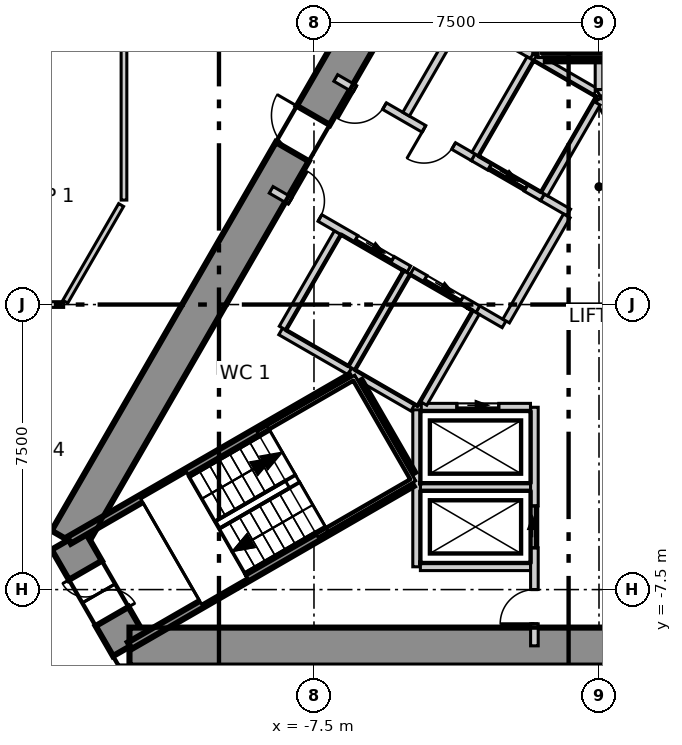
"""IFC4 building model, lengths in metres.
Left out: names, types, materials, properties, quantities, classifications, styles, units other than length and angle.
Written with IfcOpenShell. Run it as: python <this file> out.ifc"""

import sys

from ifc_helpers import new_model, si_unit, direction, frame, frame_2d, origin, place, context, subcontext, project, spatial, polyline, rectangle, outline, extrude, element, fill, save


model = new_model("IFC4")
c1 = context("Model", 3, precision=1e-05, world=origin(), true_north=direction((0.0, 1.0)))
c2 = subcontext(c1, "Body", "Model", "MODEL_VIEW")
j1 = project(units=[si_unit("LENGTHUNIT", "METRE"), si_unit("PLANEANGLEUNIT", "RADIAN")], contexts=[c1])
p1 = place(None, origin())
s1 = spatial("IfcSite", under=j1, at=p1, CompositionType="ELEMENT")
p2 = place(p1, origin())
s2 = spatial("IfcBuilding", under=s1, at=p2, CompositionType="ELEMENT")
p3 = place(p2, frame((0.0, 0.0, 19.9)))
s3 = spatial("IfcBuildingStorey", under=s2, at=p3, CompositionType="ELEMENT", Elevation=19.9)
p4 = place(p3, frame((-1.617, 15.2, -0.4), z_axis=(0.0, 0.0, 1.0), x_axis=(-0.499992141631, -0.866029940768, 0.0)))
e1 = element("IfcWall", 1, at=p4, inside=s3, PredefinedType="SHEAR", context=c2, shape_type="SweptSolid", body=[
    extrude(outline(polyline([(-0.289, -0.499), (1.656, -0.499), (3.601, -0.499), (5.547, -0.499), (7.492, -0.499), (9.437, -0.5), (11.382, -0.5), (13.328, -0.5), (15.273, -0.5), (17.218, -0.5), (19.163, -0.5), (21.109, -0.5), (23.054, -0.5), (24.999, -0.5), (24.422, 0.5), (22.566, 0.5), (20.709, 0.5), (18.853, 0.5), (16.997, 0.5), (15.14, 0.5), (13.284, 0.5), (11.427, 0.5), (9.571, 0.5), (7.715, 0.5), (5.858, 0.5), (4.002, 0.5), (2.146, 0.5), (0.289, 0.5), (-0.289, -0.499)])), origin(), (0.0, 0.0, 1.0), 5.4),
])
p5 = place(p4, frame((11.805, 0.0, 0.4)))
e2 = element("IfcOpeningElement", 2, at=p5, cuts=e1, PredefinedType="OPENING", context=c2, shape_type="SweptSolid", body=[
    extrude(rectangle(XDim=1.1, YDim=2.1, at=frame_2d((0.55, 1.05))), frame((0.0, 0.51, 0.0), z_axis=(0.0, -1.0, 0.0), x_axis=(1.0, 0.0, 0.0)), (0.0, 0.0, 1.0), 1.02),
])
p6 = place(p3, frame((-13.972, -6.2, -0.4), z_axis=(0.0, 0.0, 1.0), x_axis=(0.500077567175, -0.865980615723, 0.0)))
e3 = element("IfcWall", 3, at=p6, inside=s3, PredefinedType="SHEAR", context=c2, shape_type="SweptSolid", body=[
    extrude(outline(polyline([(-0.289, -0.5), (1.616, -0.5), (3.522, -0.5), (2.944, 0.499), (1.617, 0.5), (0.289, 0.5), (-0.289, -0.5)])), origin(), (0.0, 0.0, 1.0), 5.4),
])
p7 = place(p6, frame((0.917, 0.0, 0.4)))
e4 = element("IfcOpeningElement", 4, at=p7, cuts=e3, PredefinedType="OPENING", context=c2, shape_type="SweptSolid", body=[
    extrude(rectangle(XDim=1.4, YDim=2.1, at=frame_2d((0.7, 1.05))), frame((0.0, 0.51, 0.0), z_axis=(0.0, -1.0, 0.0), x_axis=(1.0, 0.0, 0.0)), (0.0, 0.0, 1.0), 1.02),
])
p8 = place(p3, frame((-12.355, -9.0, -0.4), z_axis=(0.0, 0.0, 1.0), x_axis=(1.0, 0.0, 0.0)))
e5 = element("IfcWall", 5, at=p8, inside=s3, PredefinedType="SHEAR", context=c2, shape_type="SweptSolid", body=[
    extrude(outline(polyline([(-0.289, -0.5), (1.656, -0.5), (3.601, -0.5), (5.547, -0.5), (7.492, -0.5), (9.437, -0.5), (11.382, -0.5), (13.328, -0.5), (15.273, -0.5), (17.218, -0.5), (19.163, -0.5), (21.109, -0.5), (23.054, -0.5), (24.999, -0.5), (24.422, 0.5), (22.566, 0.5), (20.709, 0.5), (18.853, 0.5), (16.996, 0.5), (15.14, 0.5), (13.283, 0.5), (11.427, 0.5), (9.57, 0.5), (7.714, 0.5), (5.857, 0.5), (4.001, 0.5), (2.145, 0.5), (0.288, 0.5), (-0.289, -0.5)])), origin(), (0.0, 0.0, 1.0), 5.4),
])
p9 = place(p3, frame((-20.467, 0.0, 0.0), z_axis=(0.0, 0.0, 1.0), x_axis=(1.0, 0.0, 0.0)))
e6 = element("IfcWall", 6, at=p9, inside=s3, PredefinedType="PARTITIONING", context=c2, shape_type="SweptSolid", body=[
    extrude(rectangle(XDim=6.38, YDim=0.15, at=frame_2d((3.19, 0.0))), origin(), (0.0, 0.0, 1.0), 5.0),
])
p10 = place(p3, frame((-12.5, 2.749, 0.0), z_axis=(0.0, 0.0, 1.0), x_axis=(0.0, 1.0, 0.0)))
e7 = element("IfcWall", 7, at=p10, inside=s3, PredefinedType="PARTITIONING", context=c2, shape_type="SweptSolid", body=[
    extrude(rectangle(XDim=7.176, YDim=0.15, at=frame_2d((3.588, 0.0))), origin(), (0.0, 0.0, 1.0), 5.0),
])
p11 = place(p3, frame((-14.044, 0.075, 0.0), z_axis=(0.0, 0.0, 1.0), x_axis=(0.500062965414, 0.865989047634, 0.0)))
e8 = element("IfcWall", 8, at=p11, inside=s3, PredefinedType="PARTITIONING", context=c2, shape_type="SweptSolid", body=[
    extrude(rectangle(XDim=2.938, YDim=0.15, at=frame_2d((1.469, 0.0))), origin(), (0.0, 0.0, 1.0), 5.0),
])
p12 = place(p3, frame((-8.376, -0.707, 0.0), z_axis=(0.0, 0.0, 1.0), x_axis=(0.866067520717, -0.499927044236, 0.0)))
e9 = element("IfcWall", 9, at=p12, inside=s3, PredefinedType="SOLIDWALL", context=c2, shape_type="SweptSolid", body=[
    extrude(rectangle(XDim=2.1, YDim=0.2, at=frame_2d((1.05, 0.0))), origin(), (0.0, 0.0, 1.0), 5.0),
])
p13 = place(p3, frame((-8.326, -0.62, 0.0), z_axis=(0.0, 0.0, 1.0), x_axis=(0.500023687443, 0.866011727401, 0.0)))
e10 = element("IfcWall", 10, at=p13, inside=s3, PredefinedType="SOLIDWALL", context=c2, shape_type="SweptSolid", body=[
    extrude(rectangle(XDim=2.9, YDim=0.2, at=frame_2d((1.45, 0.0))), origin(), (0.0, 0.0, 1.0), 5.0),
])
p14 = place(p3, frame((-4.7, -4.8, 0.0), z_axis=(0.0, 0.0, 1.0), x_axis=(1.0, 0.0, 0.0)))
e11 = element("IfcWall", 11, at=p14, inside=s3, PredefinedType="SOLIDWALL", context=c2, shape_type="SweptSolid", body=[
    extrude(rectangle(XDim=2.9, YDim=0.2, at=frame_2d((1.45, 0.0))), origin(), (0.0, 0.0, 1.0), 5.0),
])
p15 = place(p3, frame((-4.8, -6.9, 0.0), z_axis=(0.0, 0.0, 1.0), x_axis=(0.0, 1.0, 0.0)))
e12 = element("IfcWall", 12, at=p15, inside=s3, PredefinedType="SOLIDWALL", context=c2, shape_type="SweptSolid", body=[
    extrude(rectangle(XDim=4.131, YDim=0.2, at=frame_2d((2.065, 0.0))), origin(), (0.0, 0.0, 1.0), 5.0),
])
p16 = place(p3, frame((-4.7, -6.9, 0.0), z_axis=(0.0, 0.0, 1.0), x_axis=(1.0, 0.0, 0.0)))
e13 = element("IfcWall", 13, at=p16, inside=s3, PredefinedType="SOLIDWALL", context=c2, shape_type="SweptSolid", body=[
    extrude(rectangle(XDim=2.9, YDim=0.2, at=frame_2d((1.45, 0.0))), origin(), (0.0, 0.0, 1.0), 5.0),
])
p17 = place(p3, frame((-1.7, -8.98, 0.0), z_axis=(0.0, 0.0, 1.0), x_axis=(0.0, 1.0, 0.0)))
e14 = element("IfcWall", 14, at=p17, inside=s3, PredefinedType="SOLIDWALL", context=c2, shape_type="SweptSolid", body=[
    extrude(rectangle(XDim=6.277, YDim=0.2, at=frame_2d((3.139, 0.0))), origin(), (0.0, 0.0, 1.0), 5.0),
])
p18 = place(p17, frame((2.58, 0.0, 0.0)))
e15 = element("IfcOpeningElement", 15, at=p18, cuts=e14, PredefinedType="OPENING", context=c2, shape_type="SweptSolid", body=[
    extrude(rectangle(XDim=1.1, YDim=2.1, at=frame_2d((0.55, 1.05))), frame((0.0, 0.11, 0.0), z_axis=(0.0, -1.0, 0.0), x_axis=(1.0, 0.0, 0.0)), (0.0, 0.0, 1.0), 0.22),
])
p19 = place(p17, frame((0.58, 0.0, 0.0)))
e16 = element("IfcOpeningElement", 16, at=p19, cuts=e14, PredefinedType="OPENING", context=c2, shape_type="SweptSolid", body=[
    extrude(rectangle(XDim=0.9, YDim=2.1, at=frame_2d((0.45, 1.05))), frame((0.0, 0.11, 0.0), z_axis=(0.0, -1.0, 0.0), x_axis=(1.0, 0.0, 0.0)), (0.0, 0.0, 1.0), 0.22),
])
p20 = place(p3, frame((-4.676, -2.7, 0.0), z_axis=(0.0, 0.0, 1.0), x_axis=(1.0, 0.0, 0.0)))
e17 = element("IfcWall", 17, at=p20, inside=s3, PredefinedType="SOLIDWALL", context=c2, shape_type="SweptSolid", body=[
    extrude(rectangle(XDim=2.873, YDim=0.2, at=frame_2d((1.437, 0.0))), origin(), (0.0, 0.0, 1.0), 5.0),
])
p21 = place(p20, frame((0.937, 0.0, 0.0)))
e18 = element("IfcOpeningElement", 18, at=p21, cuts=e17, PredefinedType="OPENING", context=c2, shape_type="SweptSolid", body=[
    extrude(rectangle(XDim=1.1, YDim=2.1, at=frame_2d((0.55, 1.05))), frame((0.0, 0.11, 0.0), z_axis=(0.0, -1.0, 0.0), x_axis=(1.0, 0.0, 0.0)), (0.0, 0.0, 1.0), 0.22),
])
p22 = place(p3, frame((-0.002, 5.542, 0.0), z_axis=(0.0, 0.0, 1.0), x_axis=(0.866103910842, 0.499863997127, 0.0)))
e19 = element("IfcWall", 19, at=p22, inside=s3, PredefinedType="SOLIDWALL", context=c2, shape_type="SweptSolid", body=[
    extrude(rectangle(XDim=4.131, YDim=0.2, at=frame_2d((2.065, 0.0))), origin(), (0.0, 0.0, 1.0), 5.0),
])
p23 = place(p3, frame((0.0, 5.4, 0.0), z_axis=(0.0, 0.0, 1.0), x_axis=(0.500103862429, -0.865965430478, 0.0)))
e20 = element("IfcWall", 20, at=p23, inside=s3, PredefinedType="SOLIDWALL", context=c2, shape_type="SweptSolid", body=[
    extrude(rectangle(XDim=2.973, YDim=0.2, at=frame_2d((1.487, 0.0))), origin(), (0.0, 0.0, 1.0), 5.0),
])
p24 = place(p23, frame((0.937, 0.0, 0.0)))
e21 = element("IfcOpeningElement", 21, at=p24, cuts=e20, PredefinedType="OPENING", context=c2, shape_type="SweptSolid", body=[
    extrude(rectangle(XDim=1.1, YDim=2.1, at=frame_2d((0.55, 1.05))), frame((0.0, 0.11, 0.0), z_axis=(0.0, -1.0, 0.0), x_axis=(1.0, 0.0, 0.0)), (0.0, 0.0, 1.0), 0.22),
])
p25 = place(p3, frame((-8.627, 3.018, 0.0), z_axis=(0.0, 0.0, 1.0), x_axis=(0.866039775641, -0.499975106388, 0.0)))
e22 = element("IfcWall", 22, at=p25, inside=s3, PredefinedType="SOLIDWALL", context=c2, shape_type="SweptSolid", body=[
    extrude(rectangle(XDim=4.182, YDim=0.2, at=frame_2d((2.091, 0.0))), origin(), (0.0, 0.0, 1.0), 5.0),
])
p26 = place(p25, frame((2.58, 0.0, 0.0)))
e23 = element("IfcOpeningElement", 23, at=p26, cuts=e22, PredefinedType="OPENING", context=c2, shape_type="SweptSolid", body=[
    extrude(rectangle(XDim=1.1, YDim=2.1, at=frame_2d((0.55, 1.05))), frame((0.0, 0.11, 0.0), z_axis=(0.0, -1.0, 0.0), x_axis=(1.0, 0.0, 0.0)), (0.0, 0.0, 1.0), 0.22),
])
p27 = place(p25, frame((0.58, 0.0, 0.0)))
e24 = element("IfcOpeningElement", 24, at=p27, cuts=e22, PredefinedType="OPENING", context=c2, shape_type="SweptSolid", body=[
    extrude(rectangle(XDim=0.9, YDim=2.1, at=frame_2d((0.45, 1.05))), frame((0.0, 0.11, 0.0), z_axis=(0.0, -1.0, 0.0), x_axis=(1.0, 0.0, 0.0)), (0.0, 0.0, 1.0), 0.22),
])
p28 = place(p3, frame((-3.188, -0.122, 0.0), z_axis=(0.0, 0.0, 1.0), x_axis=(0.865705793592, -0.50055317294, 0.0)))
e25 = element("IfcWall", 25, at=p28, inside=s3, PredefinedType="SOLIDWALL", context=c2, shape_type="SweptSolid", body=[
    extrude(rectangle(XDim=0.797, YDim=0.2, at=frame_2d((0.398, 0.0))), origin(), (0.0, 0.0, 1.0), 5.0),
])
p29 = place(p3, frame((-6.927, 5.962, 0.0), z_axis=(0.0, 0.0, 1.0), x_axis=(0.866065051207, -0.49993132236, 0.0)))
e26 = element("IfcWall", 26, at=p29, inside=s3, PredefinedType="SOLIDWALL", context=c2, shape_type="SweptSolid", body=[
    extrude(rectangle(XDim=4.182, YDim=0.2, at=frame_2d((2.091, 0.0))), origin(), (0.0, 0.0, 1.0), 5.0),
])
p30 = place(p29, frame((2.68, 0.0, 0.0)))
e27 = element("IfcOpeningElement", 27, at=p30, cuts=e26, PredefinedType="OPENING", context=c2, shape_type="SweptSolid", body=[
    extrude(rectangle(XDim=0.9, YDim=2.1, at=frame_2d((0.45, 1.05))), frame((0.0, 0.11, 0.0), z_axis=(0.0, -1.0, 0.0), x_axis=(1.0, 0.0, 0.0)), (0.0, 0.0, 1.0), 0.22),
])
p31 = place(p29, frame((0.58, 0.0, 0.0)))
e28 = element("IfcOpeningElement", 28, at=p31, cuts=e26, PredefinedType="OPENING", context=c2, shape_type="SweptSolid", body=[
    extrude(rectangle(XDim=0.9, YDim=2.1, at=frame_2d((0.45, 1.05))), frame((0.0, 0.11, 0.0), z_axis=(0.0, -1.0, 0.0), x_axis=(1.0, 0.0, 0.0)), (0.0, 0.0, 1.0), 0.22),
])
p32 = place(p3, frame((-1.488, 2.822, 0.0), z_axis=(0.0, 0.0, 1.0), x_axis=(0.866236612152, -0.499633997809, 0.0)))
e29 = element("IfcWall", 29, at=p32, inside=s3, PredefinedType="SOLIDWALL", context=c2, shape_type="SweptSolid", body=[
    extrude(rectangle(XDim=0.796, YDim=0.2, at=frame_2d((0.398, 0.0))), origin(), (0.0, 0.0, 1.0), 5.0),
])
p33 = place(p3, frame((-5.076, 5.009, 0.0), z_axis=(0.0, 0.0, 1.0), x_axis=(0.50002537861, 0.866010750942, 0.0)))
e30 = element("IfcWall", 30, at=p33, inside=s3, PredefinedType="SOLIDWALL", context=c2, shape_type="SweptSolid", body=[
    extrude(rectangle(XDim=3.0, YDim=0.2, at=frame_2d((1.5, 0.0))), origin(), (0.0, 0.0, 1.0), 5.0),
])
p34 = place(p3, frame((-3.489, 7.557, 0.0), z_axis=(0.0, 0.0, 1.0), x_axis=(0.866010750942, -0.50002537861, 0.0)))
e31 = element("IfcWall", 31, at=p34, inside=s3, PredefinedType="SOLIDWALL", context=c2, shape_type="SweptSolid", body=[
    extrude(rectangle(XDim=2.0, YDim=0.2, at=frame_2d((1.0, 0.0))), origin(), (0.0, 0.0, 1.0), 5.0),
])
p35 = place(p3, frame((-2.444, -0.433, 0.0), z_axis=(0.0, 0.0, 1.0), x_axis=(0.500035624827, 0.866004834804, 0.0)))
e32 = element("IfcWall", 32, at=p35, inside=s3, PredefinedType="SOLIDWALL", context=c2, shape_type="SweptSolid", body=[
    extrude(rectangle(XDim=3.194, YDim=0.2, at=frame_2d((1.597, 0.0))), origin(), (0.0, 0.0, 1.0), 5.0),
])
p36 = place(p3, frame((-6.557, -1.757, 0.0), z_axis=(0.0, 0.0, 1.0), x_axis=(0.8659754619, -0.500086491905, 0.0)))
e33 = element("IfcWall", 33, at=p36, inside=s3, PredefinedType="SOLIDWALL", context=c2, shape_type="SweptSolid", body=[
    extrude(rectangle(XDim=1.916, YDim=0.2, at=frame_2d((0.958, 0.0))), origin(), (0.0, 0.0, 1.0), 5.0),
])
p37 = place(p3, frame((-6.507, -1.67, 0.0), z_axis=(0.0, 0.0, 1.0), x_axis=(0.50012328804, 0.865954211699, 0.0)))
e34 = element("IfcWall", 34, at=p37, inside=s3, PredefinedType="SOLIDWALL", context=c2, shape_type="SweptSolid", body=[
    extrude(rectangle(XDim=2.9, YDim=0.2, at=frame_2d((1.45, 0.0))), origin(), (0.0, 0.0, 1.0), 5.0),
])
p38 = place(p3, frame((-4.92, 0.878, 0.0), z_axis=(0.0, 0.0, 1.0), x_axis=(0.866010750942, -0.50002537861, 0.0)))
e35 = element("IfcWall", 35, at=p38, inside=s3, PredefinedType="SOLIDWALL", context=c2, shape_type="SweptSolid", body=[
    extrude(rectangle(XDim=2.0, YDim=0.2, at=frame_2d((1.0, 0.0))), origin(), (0.0, 0.0, 1.0), 5.0),
])
p39 = place(p38, frame((0.4, 0.0, 0.0)))
e36 = element("IfcOpeningElement", 36, at=p39, cuts=e35, PredefinedType="OPENING", context=c2, shape_type="SweptSolid", body=[
    extrude(rectangle(XDim=1.1, YDim=2.1, at=frame_2d((0.55, 1.05))), frame((0.0, 0.11, 0.0), z_axis=(0.0, -1.0, 0.0), x_axis=(1.0, 0.0, 0.0)), (0.0, 0.0, 1.0), 0.22),
])
p40 = place(p3, frame((-4.619, -2.6, 0.0), z_axis=(0.0, 0.0, 1.0), x_axis=(0.50009492287, 0.865970593103, 0.0)))
e37 = element("IfcWall", 37, at=p40, inside=s3, PredefinedType="SOLIDWALL", context=c2, shape_type="SweptSolid", body=[
    extrude(rectangle(XDim=2.761, YDim=0.2, at=frame_2d((1.381, 0.0))), origin(), (0.0, 0.0, 1.0), 5.0),
])
p41 = place(p3, frame((-3.309, 3.873, 0.0), z_axis=(0.0, 0.0, 1.0), x_axis=(0.866098583652, -0.499873227325, 0.0)))
e38 = element("IfcWall", 38, at=p41, inside=s3, PredefinedType="SOLIDWALL", context=c2, shape_type="SweptSolid", body=[
    extrude(rectangle(XDim=2.103, YDim=0.2, at=frame_2d((1.051, 0.0))), origin(), (0.0, 0.0, 1.0), 5.0),
])
p42 = place(p41, frame((0.502, 0.0, 0.0)))
e39 = element("IfcOpeningElement", 39, at=p42, cuts=e38, PredefinedType="OPENING", context=c2, shape_type="SweptSolid", body=[
    extrude(rectangle(XDim=1.1, YDim=2.1, at=frame_2d((0.55, 1.05))), frame((0.0, 0.11, 0.0), z_axis=(0.0, -1.0, 0.0), x_axis=(1.0, 0.0, 0.0)), (0.0, 0.0, 1.0), 0.22),
])
p43 = place(p3, frame((-3.257, 3.959, 0.0), z_axis=(0.0, 0.0, 1.0), x_axis=(0.50012328804, 0.865954211699, 0.0)))
e40 = element("IfcWall", 40, at=p43, inside=s3, PredefinedType="SOLIDWALL", context=c2, shape_type="SweptSolid", body=[
    extrude(rectangle(XDim=2.9, YDim=0.2, at=frame_2d((1.45, 0.0))), origin(), (0.0, 0.0, 1.0), 5.0),
])
p44 = place(p3, frame((-1.67, 6.507, 0.0), z_axis=(0.0, 0.0, 1.0), x_axis=(0.865941441609, -0.500145398563, 0.0)))
e41 = element("IfcWall", 41, at=p44, inside=s3, PredefinedType="SOLIDWALL", context=c2, shape_type="SweptSolid", body=[
    extrude(rectangle(XDim=1.815, YDim=0.2, at=frame_2d((0.908, 0.0))), origin(), (0.0, 0.0, 1.0), 5.0),
])
p45 = place(p3, frame((-1.438, 2.909, 0.0), z_axis=(0.0, 0.0, 1.0), x_axis=(0.499829630636, 0.866123744241, 0.0)))
e42 = element("IfcWall", 42, at=p45, inside=s3, PredefinedType="SOLIDWALL", context=c2, shape_type="SweptSolid", body=[
    extrude(rectangle(XDim=2.761, YDim=0.2, at=frame_2d((1.38, 0.0))), origin(), (0.0, 0.0, 1.0), 5.0),
])
p46 = place(p3, frame((0.0, 5.658, 0.0), z_axis=(0.0, 0.0, 1.0), x_axis=(0.0, 1.0, 0.0)))
e43 = element("IfcWall", 43, at=p46, inside=s3, PredefinedType="SOLIDWALL", context=c2, shape_type="SweptSolid", body=[
    extrude(rectangle(XDim=0.742, YDim=0.2, at=frame_2d((0.371, 0.0))), origin(), (0.0, 0.0, 1.0), 5.0),
])
p47 = place(p3, frame((-13.946, -6.204, 0.0), z_axis=(0.0, 0.0, 1.0), x_axis=(0.866036527536, 0.499980732602, 0.0)))
e44 = element("IfcWall", 44, at=p47, inside=s3, PredefinedType="SOLIDWALL", context=c2, shape_type="SweptSolid", body=[
    extrude(rectangle(XDim=8.564, YDim=0.2, at=frame_2d((4.282, 0.0))), origin(), (0.0, 0.0, 1.0), 5.0),
])
p48 = place(p3, frame((-6.329, -2.038, 0.0), z_axis=(0.0, 0.0, 1.0), x_axis=(0.500200581029, -0.865909567298, 0.0)))
e45 = element("IfcWall", 45, at=p48, inside=s3, PredefinedType="SOLIDWALL", context=c2, shape_type="SweptSolid", body=[
    extrude(rectangle(XDim=2.799, YDim=0.2, at=frame_2d((1.399, 0.0))), origin(), (0.0, 0.0, 1.0), 5.0),
])
p49 = place(p3, frame((-12.346, -8.976, 0.0), z_axis=(0.0, 0.0, 1.0), x_axis=(0.865987152174, 0.50006624788, 0.0)))
e46 = element("IfcWall", 46, at=p49, inside=s3, PredefinedType="SOLIDWALL", context=c2, shape_type="SweptSolid", body=[
    extrude(rectangle(XDim=8.565, YDim=0.2, at=frame_2d((4.282, 0.0))), origin(), (0.0, 0.0, 1.0), 5.0),
])
p50 = place(p3, frame((-1.4, 6.5, 0.0), z_axis=(0.0, 0.0, 1.0), x_axis=(1.0, 0.0, 0.0)))
e47 = element("IfcWall", 47, at=p50, inside=s3, PredefinedType="SOLIDWALL", context=c2, shape_type="SweptSolid", body=[
    extrude(rectangle(XDim=2.8, YDim=0.2, at=frame_2d((1.4, 0.0))), origin(), (0.0, 0.0, 1.0), 5.0),
])
p51 = place(p3, frame((-1.6, 6.615, 0.0), z_axis=(0.0, 0.0, 1.0), x_axis=(0.0, 1.0, 0.0)))
e48 = element("IfcWall", 48, at=p51, inside=s3, PredefinedType="SOLIDWALL", context=c2, shape_type="SweptSolid", body=[
    extrude(rectangle(XDim=8.565, YDim=0.2, at=frame_2d((4.282, 0.0))), origin(), (0.0, 0.0, 1.0), 5.0),
])
p52 = place(p21, origin())
e49 = element("IfcDoor", 49, at=p52, inside=s3, OperationType="SLIDING_TO_LEFT", PredefinedType="DOOR", context=c2, shape_type="SweptSolid", body=[
    extrude(rectangle(XDim=1.1, YDim=2.1, at=frame_2d((0.55, 1.05))), frame((0.0, 0.025, 0.0), z_axis=(0.0, -1.0, 0.0), x_axis=(1.0, 0.0, 0.0)), (0.0, 0.0, 1.0), 0.05),
])
fill(e18, e49)
p53 = place(p18, origin())
e50 = element("IfcDoor", 50, at=p53, inside=s3, OperationType="SLIDING_TO_LEFT", PredefinedType="DOOR", context=c2, shape_type="SweptSolid", body=[
    extrude(rectangle(XDim=1.1, YDim=2.1, at=frame_2d((0.55, 1.05))), frame((0.0, 0.025, 0.0), z_axis=(0.0, -1.0, 0.0), x_axis=(1.0, 0.0, 0.0)), (0.0, 0.0, 1.0), 0.05),
])
fill(e15, e50)
p54 = place(p39, origin())
e51 = element("IfcDoor", 51, at=p54, inside=s3, OperationType="SLIDING_TO_LEFT", PredefinedType="DOOR", context=c2, shape_type="SweptSolid", body=[
    extrude(rectangle(XDim=1.1, YDim=2.1, at=frame_2d((0.55, 1.05))), frame((0.0, 0.025, 0.0), z_axis=(0.0, -1.0, 0.0), x_axis=(1.0, 0.0, 0.0)), (0.0, 0.0, 1.0), 0.05),
])
fill(e36, e51)
p55 = place(p42, origin())
e52 = element("IfcDoor", 52, at=p55, inside=s3, OperationType="SLIDING_TO_LEFT", PredefinedType="DOOR", context=c2, shape_type="SweptSolid", body=[
    extrude(rectangle(XDim=1.1, YDim=2.1, at=frame_2d((0.55, 1.05))), frame((0.0, 0.025, 0.0), z_axis=(0.0, -1.0, 0.0), x_axis=(1.0, 0.0, 0.0)), (0.0, 0.0, 1.0), 0.05),
])
fill(e39, e52)
p56 = place(p26, origin())
e53 = element("IfcDoor", 53, at=p56, inside=s3, OperationType="SLIDING_TO_LEFT", PredefinedType="DOOR", context=c2, shape_type="SweptSolid", body=[
    extrude(rectangle(XDim=1.1, YDim=2.1, at=frame_2d((0.55, 1.05))), frame((0.0, 0.025, 0.0), z_axis=(0.0, -1.0, 0.0), x_axis=(1.0, 0.0, 0.0)), (0.0, 0.0, 1.0), 0.05),
])
fill(e23, e53)
p57 = place(p30, origin())
e54 = element("IfcDoor", 54, at=p57, inside=s3, OperationType="SINGLE_SWING_LEFT", PredefinedType="DOOR", context=c2, shape_type="SweptSolid", body=[
    extrude(rectangle(XDim=0.9, YDim=2.1, at=frame_2d((0.45, 1.05))), frame((0.0, 0.025, 0.0), z_axis=(0.0, -1.0, 0.0), x_axis=(1.0, 0.0, 0.0)), (0.0, 0.0, 1.0), 0.05),
])
fill(e27, e54)
p58 = place(p7, origin())
e55 = element("IfcDoor", 55, at=p58, inside=s3, OperationType="DOUBLE_DOOR_SINGLE_SWING", PredefinedType="DOOR", context=c2, shape_type="SweptSolid", body=[
    extrude(rectangle(XDim=1.4, YDim=2.1, at=frame_2d((0.7, 1.05))), frame((0.0, 0.025, 0.0), z_axis=(0.0, -1.0, 0.0), x_axis=(1.0, 0.0, 0.0)), (0.0, 0.0, 1.0), 0.05),
])
fill(e4, e55)
p59 = place(p5, origin())
e56 = element("IfcDoor", 56, at=p59, inside=s3, OperationType="SINGLE_SWING_LEFT", PredefinedType="DOOR", context=c2, shape_type="SweptSolid", body=[
    extrude(rectangle(XDim=1.1, YDim=2.1, at=frame_2d((0.55, 1.05))), frame((0.0, 0.025, 0.0), z_axis=(0.0, -1.0, 0.0), x_axis=(1.0, 0.0, 0.0)), (0.0, 0.0, 1.0), 0.05),
])
fill(e2, e56)
p60 = place(p27, origin())
e57 = element("IfcDoor", 57, at=p60, inside=s3, OperationType="SINGLE_SWING_RIGHT", PredefinedType="DOOR", context=c2, shape_type="SweptSolid", body=[
    extrude(rectangle(XDim=0.9, YDim=2.1, at=frame_2d((0.45, 1.05))), frame((0.0, 0.025, 0.0), z_axis=(0.0, -1.0, 0.0), x_axis=(1.0, 0.0, 0.0)), (0.0, 0.0, 1.0), 0.05),
])
fill(e24, e57)
p61 = place(p19, origin())
e58 = element("IfcDoor", 58, at=p61, inside=s3, OperationType="SINGLE_SWING_RIGHT", PredefinedType="DOOR", context=c2, shape_type="SweptSolid", body=[
    extrude(rectangle(XDim=0.9, YDim=2.1, at=frame_2d((0.45, 1.05))), frame((0.0, 0.025, 0.0), z_axis=(0.0, -1.0, 0.0), x_axis=(1.0, 0.0, 0.0)), (0.0, 0.0, 1.0), 0.05),
])
fill(e16, e58)
p62 = place(p31, origin())
e59 = element("IfcDoor", 59, at=p62, inside=s3, OperationType="SINGLE_SWING_LEFT", PredefinedType="DOOR", context=c2, shape_type="SweptSolid", body=[
    extrude(rectangle(XDim=0.9, YDim=2.1, at=frame_2d((0.45, 1.05))), frame((0.0, 0.025, 0.0), z_axis=(0.0, -1.0, 0.0), x_axis=(1.0, 0.0, 0.0)), (0.0, 0.0, 1.0), 0.05),
])
fill(e28, e59)
save(model, sys.argv[1])
